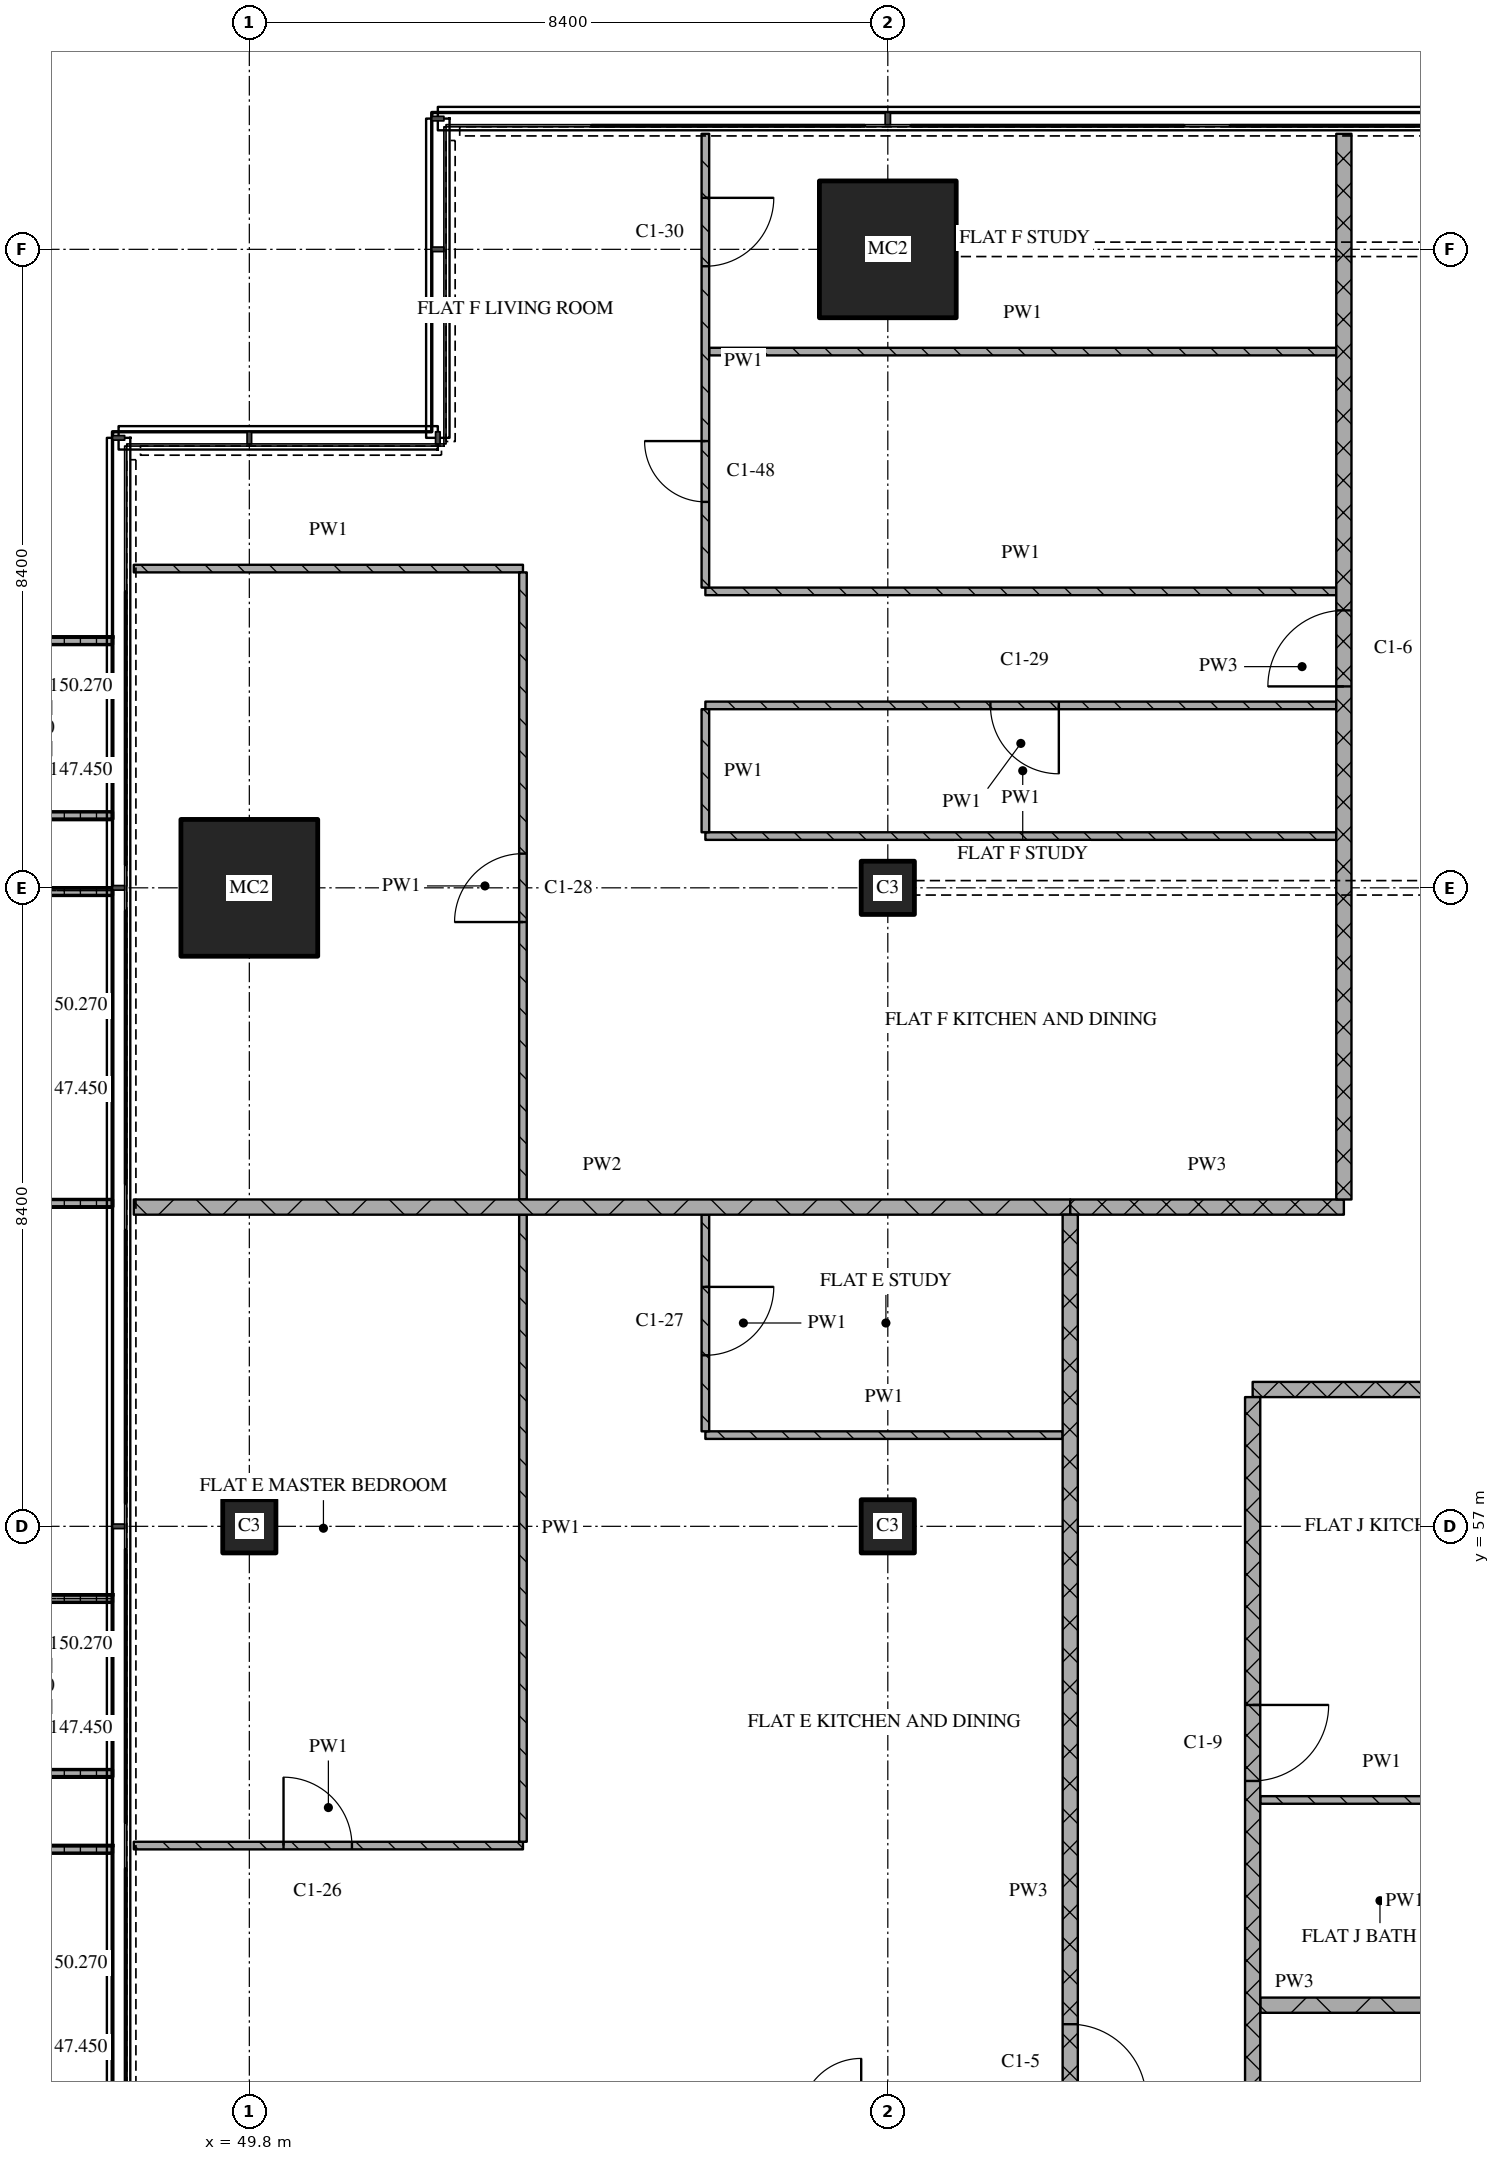
"""IFC4 building model, lengths in metres.
Left out: names, types, materials, properties, quantities, classifications, styles, units other than length and angle.
Written with IfcOpenShell. Run it as: python <this file> out.ifc"""

import sys

from ifc_helpers import new_model, si_unit, direction, frame, frame_2d, origin, origin_2d, place, context, subcontext, project, spatial, polyline, rectangle, outline, extrude, element, fill, save


model = new_model("IFC4")
c1 = context("Model", 3, precision=1e-05, world=origin(), true_north=direction((0.0, 1.0)))
c2 = subcontext(c1, "Body", "Model", "MODEL_VIEW")
j1 = project(units=[si_unit("LENGTHUNIT", "METRE"), si_unit("PLANEANGLEUNIT", "RADIAN")], contexts=[c1])
p1 = place(None, origin())
s1 = spatial("IfcSite", under=j1, at=p1, CompositionType="ELEMENT")
p2 = place(p1, origin())
s2 = spatial("IfcBuilding", under=s1, at=p2, CompositionType="ELEMENT")
p3 = place(p2, frame((0.0, 0.0, 147.45)))
s3 = spatial("IfcBuildingStorey", under=s2, at=p3, CompositionType="ELEMENT", Elevation=147.45)
p4 = place(p3, frame((49.8, 57.0, 0.0), z_axis=(0.0, 0.0, 1.0), x_axis=(1.0, 0.0, 0.0)))
e1 = element("IfcColumn", 1, at=p4, inside=s3, PredefinedType="COLUMN", context=c2, shape_type="SweptSolid", body=[
    extrude(rectangle(XDim=0.7, YDim=0.7, at=origin_2d()), origin(), (0.0, 0.0, 1.0), 3.6),
])
p5 = place(p3, frame((49.8, 65.4, 0.0), z_axis=(0.0, 0.0, 1.0), x_axis=(1.0, 0.0, 0.0)))
e2 = element("IfcColumn", 2, at=p5, inside=s3, PredefinedType="COLUMN", context=c2, shape_type="SweptSolid", body=[
    extrude(rectangle(XDim=1.8, YDim=1.8, at=origin_2d()), origin(), (0.0, 0.0, 1.0), 3.6),
])
for number, where, z_axis, x_axis in (
    (3, (58.2, 57.0, 0.0), (0.0, 0.0, 1.0), (1.0, 0.0, 0.0)),
    (4, (58.2, 65.4, 0.0), (0.0, 0.0, 1.0), (1.0, 0.0, 0.0)),
):
    element("IfcColumn", number, at=place(p3, frame(where, z_axis=z_axis, x_axis=x_axis)), inside=s3, PredefinedType="COLUMN", context=c2, shape_type="SweptSolid", body=[
        extrude(rectangle(XDim=0.7, YDim=0.7, at=origin_2d()), origin(), (0.0, 0.0, 1.0), 3.6),
    ])
p6 = place(p3, frame((58.2, 73.8, 0.0), z_axis=(0.0, 0.0, 1.0), x_axis=(1.0, 0.0, 0.0)))
e5 = element("IfcColumn", 5, at=p6, inside=s3, PredefinedType="COLUMN", context=c2, shape_type="SweptSolid", body=[
    extrude(rectangle(XDim=1.8, YDim=1.8, at=origin_2d()), origin(), (0.0, 0.0, 1.0), 3.6),
])
p7 = place(p3, origin())
e6 = element("IfcWall", 6, at=p7, inside=s3, PredefinedType="SOLIDWALL", context=c2, shape_type="SweptSolid", body=[
    extrude(outline(polyline([(48.0, 68.7), (48.0, 68.6), (46.5, 68.6), (46.5, 66.4), (48.0, 66.4), (48.0, 66.3), (46.4, 66.3), (46.4, 68.7), (48.0, 68.7)])), origin(), (0.0, 0.0, 1.0), 1.0),
])
p8 = place(p3, origin())
e7 = element("IfcWall", 7, at=p8, inside=s3, PredefinedType="SOLIDWALL", context=c2, shape_type="SweptSolid", body=[
    extrude(outline(polyline([(48.0, 65.4), (48.0, 65.3), (46.367, 65.3), (46.367, 61.3), (48.0, 61.3), (48.0, 61.2), (46.267, 61.2), (46.267, 65.4), (48.0, 65.4)])), origin(), (0.0, 0.0, 1.0), 1.0),
])
p9 = place(p3, origin())
e8 = element("IfcWall", 8, at=p9, inside=s3, PredefinedType="SOLIDWALL", context=c2, shape_type="SweptSolid", body=[
    extrude(outline(polyline([(48.0, 56.1), (48.0, 56.0), (46.5, 56.0), (46.5, 53.8), (48.0, 53.8), (48.0, 53.7), (46.4, 53.7), (46.4, 56.1), (48.0, 56.1)])), origin(), (0.0, 0.0, 1.0), 1.0),
])
p10 = place(p3, origin())
e9 = element("IfcWall", 9, at=p10, inside=s3, PredefinedType="SOLIDWALL", context=c2, shape_type="SweptSolid", body=[
    extrude(outline(polyline([(48.0, 52.8), (48.0, 52.7), (46.367, 52.7), (46.367, 48.7), (48.0, 48.7), (48.0, 48.6), (46.267, 48.6), (46.267, 52.8), (48.0, 52.8)])), origin(), (0.0, 0.0, 1.0), 1.0),
])
p11 = place(p3, frame((63.1, 50.7, 0.0), z_axis=(0.0, 0.0, 1.0), x_axis=(1.0, 0.0, 0.0)))
e10 = element("IfcWall", 10, at=p11, inside=s3, PredefinedType="PARTITIONING", context=c2, shape_type="SweptSolid", body=[
    extrude(rectangle(XDim=5.1, YDim=0.2, at=frame_2d((2.55, 0.0))), origin(), (0.0, 0.0, 1.0), 3.32),
])
p12 = place(p3, frame((48.28, 52.8, 0.0), z_axis=(0.0, 0.0, 1.0), x_axis=(1.0, 0.0, 0.0)))
e11 = element("IfcWall", 11, at=p12, inside=s3, PredefinedType="PARTITIONING", context=c2, shape_type="SweptSolid", body=[
    extrude(rectangle(XDim=5.12, YDim=0.1, at=frame_2d((2.56, 0.0))), origin(), (0.0, 0.0, 1.0), 3.32),
])
p13 = place(p12, frame((1.97, 0.0, 0.0)))
e12 = element("IfcOpeningElement", 12, at=p13, cuts=e11, PredefinedType="OPENING", context=c2, shape_type="SweptSolid", body=[
    extrude(rectangle(XDim=0.9, YDim=2.1, at=frame_2d((0.45, 1.05))), frame((0.0, 0.06, 0.0), z_axis=(0.0, -1.0, 0.0), x_axis=(1.0, 0.0, 0.0)), (0.0, 0.0, 1.0), 0.12),
])
p14 = place(p3, frame((63.1, 53.4, 0.0), z_axis=(0.0, 0.0, 1.0), x_axis=(1.0, 0.0, 0.0)))
e13 = element("IfcWall", 13, at=p14, inside=s3, PredefinedType="PARTITIONING", context=c2, shape_type="SweptSolid", body=[
    extrude(rectangle(XDim=3.2, YDim=0.1, at=frame_2d((1.6, 0.0))), origin(), (0.0, 0.0, 1.0), 3.32),
])
p15 = place(p3, frame((55.8, 58.2, 0.0), z_axis=(0.0, 0.0, 1.0), x_axis=(1.0, 0.0, 0.0)))
e14 = element("IfcWall", 14, at=p15, inside=s3, PredefinedType="PARTITIONING", context=c2, shape_type="SweptSolid", body=[
    extrude(rectangle(XDim=4.7, YDim=0.1, at=frame_2d((2.35, 0.0))), origin(), (0.0, 0.0, 1.0), 3.32),
])
p16 = place(p3, frame((63.0, 58.8, 0.0), z_axis=(0.0, 0.0, 1.0), x_axis=(1.0, 0.0, 0.0)))
e15 = element("IfcWall", 15, at=p16, inside=s3, PredefinedType="PARTITIONING", context=c2, shape_type="SweptSolid", body=[
    extrude(rectangle(XDim=10.8, YDim=0.2, at=frame_2d((5.4, 0.0))), origin(), (0.0, 0.0, 1.0), 3.32),
])
p17 = place(p3, frame((60.6, 61.2, 0.0), z_axis=(0.0, 0.0, 1.0), x_axis=(1.0, 0.0, 0.0)))
e16 = element("IfcWall", 16, at=p17, inside=s3, PredefinedType="PARTITIONING", context=c2, shape_type="SweptSolid", body=[
    extrude(rectangle(XDim=3.6, YDim=0.2, at=frame_2d((1.8, 0.0))), origin(), (0.0, 0.0, 1.0), 3.32),
])
p18 = place(p3, frame((48.28, 61.2, 0.0), z_axis=(0.0, 0.0, 1.0), x_axis=(1.0, 0.0, 0.0)))
e17 = element("IfcWall", 17, at=p18, inside=s3, PredefinedType="PARTITIONING", context=c2, shape_type="SweptSolid", body=[
    extrude(rectangle(XDim=12.32, YDim=0.2, at=frame_2d((6.16, 0.0))), origin(), (0.0, 0.0, 1.0), 3.32),
])
p19 = place(p3, frame((55.8, 66.081, 0.0), z_axis=(0.0, 0.0, 1.0), x_axis=(1.0, 0.0, 0.0)))
e18 = element("IfcWall", 18, at=p19, inside=s3, PredefinedType="PARTITIONING", context=c2, shape_type="SweptSolid", body=[
    extrude(rectangle(XDim=8.3, YDim=0.1, at=frame_2d((4.15, 0.0))), origin(), (0.0, 0.0, 1.0), 3.32),
])
p20 = place(p3, frame((64.1, 67.8, 0.0), z_axis=(0.0, 0.0, 1.0), x_axis=(-1.0, 0.0, 0.0)))
e19 = element("IfcWall", 19, at=p20, inside=s3, PredefinedType="PARTITIONING", context=c2, shape_type="SweptSolid", body=[
    extrude(rectangle(XDim=8.3, YDim=0.1, at=frame_2d((4.15, 0.0))), origin(), (0.0, 0.0, 1.0), 3.32),
])
p21 = place(p20, frame((3.65, 0.0, 0.0)))
e20 = element("IfcOpeningElement", 20, at=p21, cuts=e19, PredefinedType="OPENING", context=c2, shape_type="SweptSolid", body=[
    extrude(rectangle(XDim=0.9, YDim=2.1, at=frame_2d((0.45, 1.05))), frame((0.0, 0.06, 0.0), z_axis=(0.0, -1.0, 0.0), x_axis=(1.0, 0.0, 0.0)), (0.0, 0.0, 1.0), 0.12),
])
p22 = place(p3, frame((55.8, 69.3, 0.0), z_axis=(0.0, 0.0, 1.0), x_axis=(1.0, 0.0, 0.0)))
e21 = element("IfcWall", 21, at=p22, inside=s3, PredefinedType="PARTITIONING", context=c2, shape_type="SweptSolid", body=[
    extrude(rectangle(XDim=8.3, YDim=0.1, at=frame_2d((4.15, 0.0))), origin(), (0.0, 0.0, 1.0), 3.32),
])
p23 = place(p3, frame((48.28, 69.6, 0.0), z_axis=(0.0, 0.0, 1.0), x_axis=(1.0, 0.0, 0.0)))
e22 = element("IfcWall", 22, at=p23, inside=s3, PredefinedType="PARTITIONING", context=c2, shape_type="SweptSolid", body=[
    extrude(rectangle(XDim=5.12, YDim=0.1, at=frame_2d((2.56, 0.0))), origin(), (0.0, 0.0, 1.0), 3.32),
])
p24 = place(p3, frame((55.85, 72.455, 0.0), z_axis=(0.0, 0.0, 1.0), x_axis=(1.0, 0.0, 0.0)))
e23 = element("IfcWall", 23, at=p24, inside=s3, PredefinedType="PARTITIONING", context=c2, shape_type="SweptSolid", body=[
    extrude(rectangle(XDim=8.25, YDim=0.1, at=frame_2d((4.125, 0.0))), origin(), (0.0, 0.0, 1.0), 3.32),
])
p25 = place(p3, frame((55.8, 61.1, 0.0), z_axis=(0.0, 0.0, 1.0), x_axis=(0.0, -1.0, 0.0)))
e24 = element("IfcWall", 24, at=p25, inside=s3, PredefinedType="PARTITIONING", context=c2, shape_type="SweptSolid", body=[
    extrude(rectangle(XDim=2.85, YDim=0.1, at=frame_2d((1.425, 0.0))), origin(), (0.0, 0.0, 1.0), 3.32),
])
p26 = place(p25, frame((0.95, 0.0, 0.0)))
e25 = element("IfcOpeningElement", 25, at=p26, cuts=e24, PredefinedType="OPENING", context=c2, shape_type="SweptSolid", body=[
    extrude(rectangle(XDim=0.9, YDim=2.1, at=frame_2d((0.45, 1.05))), frame((0.0, 0.06, 0.0), z_axis=(0.0, -1.0, 0.0), x_axis=(1.0, 0.0, 0.0)), (0.0, 0.0, 1.0), 0.12),
])
p27 = place(p3, frame((55.8, 67.75, 0.0), z_axis=(0.0, 0.0, 1.0), x_axis=(0.0, -1.0, 0.0)))
e26 = element("IfcWall", 26, at=p27, inside=s3, PredefinedType="PARTITIONING", context=c2, shape_type="SweptSolid", body=[
    extrude(rectangle(XDim=1.619, YDim=0.1, at=frame_2d((0.81, 0.0))), origin(), (0.0, 0.0, 1.0), 3.32),
])
p28 = place(p3, frame((55.8, 75.32, 0.0), z_axis=(0.0, 0.0, 1.0), x_axis=(0.0, -1.0, 0.0)))
e27 = element("IfcWall", 27, at=p28, inside=s3, PredefinedType="PARTITIONING", context=c2, shape_type="SweptSolid", body=[
    extrude(rectangle(XDim=5.97, YDim=0.1, at=frame_2d((2.985, 0.0))), origin(), (0.0, 0.0, 1.0), 3.32),
])
p29 = place(p28, frame((0.843, 0.0, 0.0)))
e28 = element("IfcOpeningElement", 28, at=p29, cuts=e27, PredefinedType="OPENING", context=c2, shape_type="SweptSolid", body=[
    extrude(rectangle(XDim=0.9, YDim=2.1, at=frame_2d((0.45, 1.05))), frame((0.0, 0.06, 0.0), z_axis=(0.0, -1.0, 0.0), x_axis=(1.0, 0.0, 0.0)), (0.0, 0.0, 1.0), 0.12),
])
p30 = place(p28, frame((4.042, 0.0, 0.0)))
e29 = element("IfcOpeningElement", 29, at=p30, cuts=e27, PredefinedType="OPENING", context=c2, shape_type="SweptSolid", body=[
    extrude(rectangle(XDim=0.8, YDim=2.1, at=frame_2d((0.4, 1.05))), frame((0.0, 0.06, 0.0), z_axis=(0.0, -1.0, 0.0), x_axis=(1.0, 0.0, 0.0)), (0.0, 0.0, 1.0), 0.12),
])
p31 = place(p3, frame((60.6, 43.3, 0.0), z_axis=(0.0, 0.0, 1.0), x_axis=(0.0, 1.0, 0.0)))
e30 = element("IfcWall", 30, at=p31, inside=s3, PredefinedType="PARTITIONING", context=c2, shape_type="SweptSolid", body=[
    extrude(rectangle(XDim=17.8, YDim=0.2, at=frame_2d((8.9, 0.0))), origin(), (0.0, 0.0, 1.0), 3.32),
])
p32 = place(p31, frame((6.15, 0.0, 0.0)))
e31 = element("IfcOpeningElement", 31, at=p32, cuts=e30, PredefinedType="OPENING", context=c2, shape_type="SweptSolid", body=[
    extrude(rectangle(XDim=1.0, YDim=2.1, at=frame_2d((0.5, 1.05))), frame((0.0, 0.11, 0.0), z_axis=(0.0, -1.0, 0.0), x_axis=(1.0, 0.0, 0.0)), (0.0, 0.0, 1.0), 0.22),
])
p33 = place(p3, frame((63.0, 58.7, 0.0), z_axis=(0.0, 0.0, 1.0), x_axis=(0.0, -1.0, 0.0)))
e32 = element("IfcWall", 32, at=p33, inside=s3, PredefinedType="PARTITIONING", context=c2, shape_type="SweptSolid", body=[
    extrude(rectangle(XDim=15.4, YDim=0.2, at=frame_2d((7.7, 0.0))), origin(), (0.0, 0.0, 1.0), 3.32),
])
p34 = place(p33, frame((4.05, 0.0, 0.0)))
e33 = element("IfcOpeningElement", 33, at=p34, cuts=e32, PredefinedType="OPENING", context=c2, shape_type="SweptSolid", body=[
    extrude(rectangle(XDim=1.0, YDim=2.1, at=frame_2d((0.5, 1.05))), frame((0.0, 0.11, 0.0), z_axis=(0.0, -1.0, 0.0), x_axis=(1.0, 0.0, 0.0)), (0.0, 0.0, 1.0), 0.22),
])
p35 = place(p33, frame((11.25, 0.0, 0.0)))
e34 = element("IfcOpeningElement", 34, at=p35, cuts=e32, PredefinedType="OPENING", context=c2, shape_type="SweptSolid", body=[
    extrude(rectangle(XDim=0.9, YDim=2.1, at=frame_2d((0.45, 1.05))), frame((0.0, 0.11, 0.0), z_axis=(0.0, -1.0, 0.0), x_axis=(1.0, 0.0, 0.0)), (0.0, 0.0, 1.0), 0.22),
])
p36 = place(p3, frame((64.2, 61.3, 0.0), z_axis=(0.0, 0.0, 1.0), x_axis=(0.0, 1.0, 0.0)))
e35 = element("IfcWall", 35, at=p36, inside=s3, PredefinedType="PARTITIONING", context=c2, shape_type="SweptSolid", body=[
    extrude(rectangle(XDim=14.02, YDim=0.2, at=frame_2d((7.01, 0.0))), origin(), (0.0, 0.0, 1.0), 3.32),
])
p37 = place(p36, frame((6.75, 0.0, 0.0)))
e36 = element("IfcOpeningElement", 36, at=p37, cuts=e35, PredefinedType="OPENING", context=c2, shape_type="SweptSolid", body=[
    extrude(rectangle(XDim=1.0, YDim=2.1, at=frame_2d((0.5, 1.05))), frame((0.0, 0.11, 0.0), z_axis=(0.0, -1.0, 0.0), x_axis=(1.0, 0.0, 0.0)), (0.0, 0.0, 1.0), 0.22),
])
p38 = place(p3, frame((53.4, 61.1, 0.0), z_axis=(0.0, 0.0, 1.0), x_axis=(0.0, -1.0, 0.0)))
e37 = element("IfcWall", 37, at=p38, inside=s3, PredefinedType="PARTITIONING", context=c2, shape_type="SweptSolid", body=[
    extrude(rectangle(XDim=8.25, YDim=0.1, at=frame_2d((4.125, 0.0))), origin(), (0.0, 0.0, 1.0), 3.32),
])
p39 = place(p3, frame((53.4, 61.3, 0.0), z_axis=(0.0, 0.0, 1.0), x_axis=(0.0, 1.0, 0.0)))
e38 = element("IfcWall", 38, at=p39, inside=s3, PredefinedType="PARTITIONING", context=c2, shape_type="SweptSolid", body=[
    extrude(rectangle(XDim=8.25, YDim=0.1, at=frame_2d((4.125, 0.0))), origin(), (0.0, 0.0, 1.0), 3.32),
])
p40 = place(p39, frame((3.65, 0.0, 0.0)))
e39 = element("IfcOpeningElement", 39, at=p40, cuts=e38, PredefinedType="OPENING", context=c2, shape_type="SweptSolid", body=[
    extrude(rectangle(XDim=0.9, YDim=2.1, at=frame_2d((0.45, 1.05))), frame((0.0, 0.06, 0.0), z_axis=(0.0, -1.0, 0.0), x_axis=(1.0, 0.0, 0.0)), (0.0, 0.0, 1.0), 0.12),
])
p41 = place(p13, origin())
e40 = element("IfcDoor", 40, at=p41, inside=s3, OperationType="SINGLE_SWING_LEFT", PredefinedType="DOOR", context=c2, shape_type="SweptSolid", body=[
    extrude(rectangle(XDim=0.9, YDim=2.1, at=frame_2d((0.45, 1.05))), frame((0.0, 0.025, 0.0), z_axis=(0.0, -1.0, 0.0), x_axis=(1.0, 0.0, 0.0)), (0.0, 0.0, 1.0), 0.05),
])
fill(e12, e40)
p42 = place(p21, origin())
e41 = element("IfcDoor", 41, at=p42, inside=s3, OperationType="SINGLE_SWING_LEFT", PredefinedType="DOOR", context=c2, shape_type="SweptSolid", body=[
    extrude(rectangle(XDim=0.9, YDim=2.1, at=frame_2d((0.45, 1.05))), frame((0.0, 0.025, 0.0), z_axis=(0.0, -1.0, 0.0), x_axis=(1.0, 0.0, 0.0)), (0.0, 0.0, 1.0), 0.05),
])
fill(e20, e41)
p43 = place(p26, origin())
e42 = element("IfcDoor", 42, at=p43, inside=s3, OperationType="SINGLE_SWING_LEFT", PredefinedType="DOOR", context=c2, shape_type="SweptSolid", body=[
    extrude(rectangle(XDim=0.9, YDim=2.1, at=frame_2d((0.45, 1.05))), frame((0.0, 0.025, 0.0), z_axis=(0.0, -1.0, 0.0), x_axis=(1.0, 0.0, 0.0)), (0.0, 0.0, 1.0), 0.05),
])
fill(e25, e42)
p44 = place(p29, origin())
e43 = element("IfcDoor", 43, at=p44, inside=s3, OperationType="SINGLE_SWING_LEFT", PredefinedType="DOOR", context=c2, shape_type="SweptSolid", body=[
    extrude(rectangle(XDim=0.9, YDim=2.1, at=frame_2d((0.45, 1.05))), frame((0.0, 0.025, 0.0), z_axis=(0.0, -1.0, 0.0), x_axis=(1.0, 0.0, 0.0)), (0.0, 0.0, 1.0), 0.05),
])
fill(e28, e43)
p45 = place(p30, origin())
e44 = element("IfcDoor", 44, at=p45, inside=s3, OperationType="SINGLE_SWING_RIGHT", PredefinedType="DOOR", context=c2, shape_type="SweptSolid", body=[
    extrude(rectangle(XDim=0.8, YDim=2.1, at=frame_2d((0.4, 1.05))), frame((0.0, 0.025, 0.0), z_axis=(0.0, -1.0, 0.0), x_axis=(1.0, 0.0, 0.0)), (0.0, 0.0, 1.0), 0.05),
])
fill(e29, e44)
p46 = place(p32, origin())
e45 = element("IfcDoor", 45, at=p46, inside=s3, OperationType="SINGLE_SWING_RIGHT", PredefinedType="DOOR", context=c2, shape_type="SweptSolid", body=[
    extrude(rectangle(XDim=1.0, YDim=2.1, at=frame_2d((0.5, 1.05))), frame((0.0, 0.025, 0.0), z_axis=(0.0, -1.0, 0.0), x_axis=(1.0, 0.0, 0.0)), (0.0, 0.0, 1.0), 0.05),
])
fill(e31, e45)
p47 = place(p34, origin())
e46 = element("IfcDoor", 46, at=p47, inside=s3, OperationType="SINGLE_SWING_LEFT", PredefinedType="DOOR", context=c2, shape_type="SweptSolid", body=[
    extrude(rectangle(XDim=1.0, YDim=2.1, at=frame_2d((0.5, 1.05))), frame((0.0, 0.025, 0.0), z_axis=(0.0, -1.0, 0.0), x_axis=(1.0, 0.0, 0.0)), (0.0, 0.0, 1.0), 0.05),
])
fill(e33, e46)
p48 = place(p37, origin())
e47 = element("IfcDoor", 47, at=p48, inside=s3, OperationType="SINGLE_SWING_LEFT", PredefinedType="DOOR", context=c2, shape_type="SweptSolid", body=[
    extrude(rectangle(XDim=1.0, YDim=2.1, at=frame_2d((0.5, 1.05))), frame((0.0, 0.025, 0.0), z_axis=(0.0, -1.0, 0.0), x_axis=(1.0, 0.0, 0.0)), (0.0, 0.0, 1.0), 0.05),
])
fill(e36, e47)
p49 = place(p40, origin())
e48 = element("IfcDoor", 48, at=p49, inside=s3, OperationType="SINGLE_SWING_LEFT", PredefinedType="DOOR", context=c2, shape_type="SweptSolid", body=[
    extrude(rectangle(XDim=0.9, YDim=2.1, at=frame_2d((0.45, 1.05))), frame((0.0, 0.025, 0.0), z_axis=(0.0, -1.0, 0.0), x_axis=(1.0, 0.0, 0.0)), (0.0, 0.0, 1.0), 0.05),
])
fill(e39, e48)
save(model, sys.argv[1])
